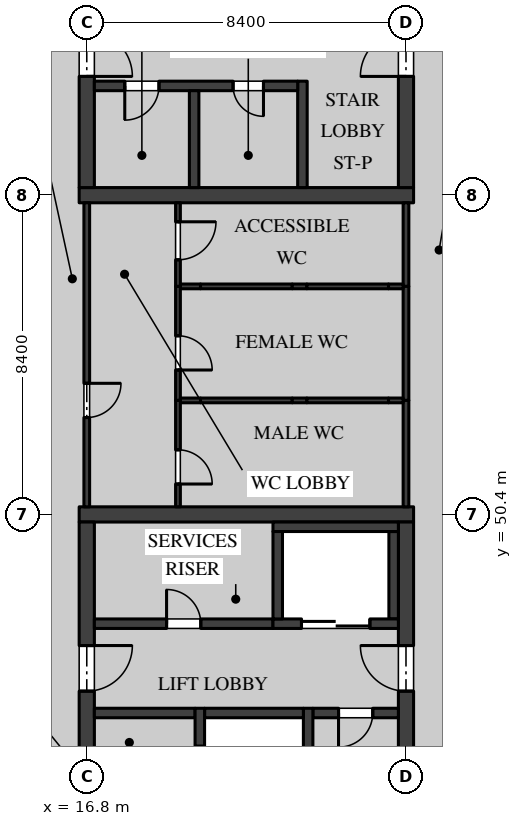
"""IFC4 building model, lengths in metres.
Left out: names, types, materials, properties, quantities, classifications, styles, units other than length and angle.
Written with IfcOpenShell. Run it as: python <this file> out.ifc"""

import sys

from ifc_helpers import new_model, si_unit, direction, frame, frame_2d, origin, place, context, subcontext, project, spatial, rectangle, extrude, element, fill, save


model = new_model("IFC4")
c1 = context("Model", 3, precision=1e-05, world=origin(), true_north=direction((0.0, 1.0)))
c2 = subcontext(c1, "Body", "Model", "MODEL_VIEW")
j1 = project(units=[si_unit("LENGTHUNIT", "METRE"), si_unit("PLANEANGLEUNIT", "RADIAN")], contexts=[c1])
p1 = place(None, origin())
s1 = spatial("IfcSite", under=j1, at=p1, CompositionType="ELEMENT")
p2 = place(p1, origin())
s2 = spatial("IfcBuilding", under=s1, at=p2, CompositionType="ELEMENT")
p3 = place(p2, frame((0.0, 0.0, 18.9)))
s3 = spatial("IfcBuildingStorey", under=s2, at=p3, CompositionType="ELEMENT", Elevation=18.9)
p4 = place(p3, frame((16.6, 50.4, 0.0), z_axis=(0.0, 0.0, 1.0), x_axis=(1.0, 0.0, 0.0)))
e1 = element("IfcWall", 1, at=p4, inside=s3, PredefinedType="SHEAR", context=c2, shape_type="SweptSolid", body=[
    extrude(rectangle(XDim=8.8, YDim=0.4, at=frame_2d((4.4, 0.0))), origin(), (0.0, 0.0, 1.0), 4.37),
])
p5 = place(p3, frame((16.8, 42.2, 0.0), z_axis=(0.0, 0.0, 1.0), x_axis=(0.0, 1.0, 0.0)))
e2 = element("IfcWall", 2, at=p5, inside=s3, PredefinedType="SHEAR", context=c2, shape_type="SweptSolid", body=[
    extrude(rectangle(XDim=8.0, YDim=0.4, at=frame_2d((4.0, 0.0))), origin(), (0.0, 0.0, 1.0), 4.37),
])
p6 = place(p5, frame((3.55, 0.0, 0.0)))
e3 = element("IfcOpeningElement", 3, at=p6, cuts=e2, PredefinedType="OPENING", context=c2, shape_type="SweptSolid", body=[
    extrude(rectangle(XDim=1.2, YDim=2.1, at=frame_2d((0.6, 1.05))), frame((0.0, 0.21, 0.0), z_axis=(0.0, -1.0, 0.0), x_axis=(1.0, 0.0, 0.0)), (0.0, 0.0, 1.0), 0.42),
])
p7 = place(p5, frame((0.8, 0.0, 0.0)))
e4 = element("IfcOpeningElement", 4, at=p7, cuts=e2, PredefinedType="OPENING", context=c2, shape_type="SweptSolid", body=[
    extrude(rectangle(XDim=1.2, YDim=2.1, at=frame_2d((0.6, 1.05))), frame((0.0, 0.21, 0.0), z_axis=(0.0, -1.0, 0.0), x_axis=(1.0, 0.0, 0.0)), (0.0, 0.0, 1.0), 0.42),
])
p8 = place(p3, frame((25.2, 42.2, 0.0), z_axis=(0.0, 0.0, 1.0), x_axis=(0.0, 1.0, 0.0)))
e5 = element("IfcWall", 5, at=p8, inside=s3, PredefinedType="SHEAR", context=c2, shape_type="SweptSolid", body=[
    extrude(rectangle(XDim=8.0, YDim=0.4, at=frame_2d((4.0, 0.0))), origin(), (0.0, 0.0, 1.0), 4.37),
])
p9 = place(p8, frame((3.55, 0.0, 0.0)))
e6 = element("IfcOpeningElement", 6, at=p9, cuts=e5, PredefinedType="OPENING", context=c2, shape_type="SweptSolid", body=[
    extrude(rectangle(XDim=1.2, YDim=2.1, at=frame_2d((0.6, 1.05))), frame((0.0, 0.21, 0.0), z_axis=(0.0, -1.0, 0.0), x_axis=(1.0, 0.0, 0.0)), (0.0, 0.0, 1.0), 0.42),
])
p10 = place(p3, frame((21.7, 47.525, 0.0), z_axis=(0.0, 0.0, 1.0), x_axis=(-1.0, 0.0, 0.0)))
e7 = element("IfcWall", 7, at=p10, inside=s3, PredefinedType="SOLIDWALL", context=c2, shape_type="SweptSolid", body=[
    extrude(rectangle(XDim=4.7, YDim=0.25, at=frame_2d((2.35, 0.0))), origin(), (0.0, 0.0, 1.0), 4.37),
])
p11 = place(p10, frame((1.9, 0.0, 0.0)))
e8 = element("IfcOpeningElement", 8, at=p11, cuts=e7, PredefinedType="OPENING", context=c2, shape_type="SweptSolid", body=[
    extrude(rectangle(XDim=0.9, YDim=2.1, at=frame_2d((0.45, 1.05))), frame((0.0, 0.135, 0.0), z_axis=(0.0, -1.0, 0.0), x_axis=(1.0, 0.0, 0.0)), (0.0, 0.0, 1.0), 0.27),
])
p12 = place(p3, frame((25.0, 45.175, 0.0), z_axis=(0.0, 0.0, 1.0), x_axis=(-1.0, 0.0, 0.0)))
e9 = element("IfcWall", 9, at=p12, inside=s3, PredefinedType="SOLIDWALL", context=c2, shape_type="SweptSolid", body=[
    extrude(rectangle(XDim=2.25, YDim=0.25, at=frame_2d((1.125, 0.0))), origin(), (0.0, 0.0, 1.0), 4.37),
])
p13 = place(p12, frame((0.675, 0.0, 0.0)))
e10 = element("IfcOpeningElement", 10, at=p13, cuts=e9, PredefinedType="OPENING", context=c2, shape_type="SweptSolid", body=[
    extrude(rectangle(XDim=0.9, YDim=2.1, at=frame_2d((0.45, 1.05))), frame((0.0, 0.135, 0.0), z_axis=(0.0, -1.0, 0.0), x_axis=(1.0, 0.0, 0.0)), (0.0, 0.0, 1.0), 0.27),
])
p14 = place(p3, frame((19.65, 45.175, 0.0), z_axis=(0.0, 0.0, 1.0), x_axis=(-1.0, 0.0, 0.0)))
e11 = element("IfcWall", 11, at=p14, inside=s3, PredefinedType="SOLIDWALL", context=c2, shape_type="SweptSolid", body=[
    extrude(rectangle(XDim=2.65, YDim=0.25, at=frame_2d((1.325, 0.0))), origin(), (0.0, 0.0, 1.0), 4.37),
])
p15 = place(p3, frame((16.6, 58.8, 0.0), z_axis=(0.0, 0.0, 1.0), x_axis=(1.0, 0.0, 0.0)))
e12 = element("IfcWall", 12, at=p15, inside=s3, PredefinedType="SHEAR", context=c2, shape_type="SweptSolid", body=[
    extrude(rectangle(XDim=8.8, YDim=0.4, at=frame_2d((4.4, 0.0))), origin(), (0.0, 0.0, 1.0), 4.37),
])
p16 = place(p3, frame((16.8, 59.0, 0.0), z_axis=(0.0, 0.0, 1.0), x_axis=(0.0, 1.0, 0.0)))
e13 = element("IfcWall", 13, at=p16, inside=s3, PredefinedType="SHEAR", context=c2, shape_type="SweptSolid", body=[
    extrude(rectangle(XDim=8.0, YDim=0.4, at=frame_2d((4.0, 0.0))), origin(), (0.0, 0.0, 1.0), 4.37),
])
p17 = place(p16, frame((2.925, 0.0, 0.0)))
e14 = element("IfcOpeningElement", 14, at=p17, cuts=e13, PredefinedType="OPENING", context=c2, shape_type="SweptSolid", body=[
    extrude(rectangle(XDim=1.2, YDim=2.1, at=frame_2d((0.6, 1.05))), frame((0.0, 0.21, 0.0), z_axis=(0.0, -1.0, 0.0), x_axis=(1.0, 0.0, 0.0)), (0.0, 0.0, 1.0), 0.42),
])
p18 = place(p3, frame((25.2, 59.0, 0.0), z_axis=(0.0, 0.0, 1.0), x_axis=(0.0, 1.0, 0.0)))
e15 = element("IfcWall", 15, at=p18, inside=s3, PredefinedType="SHEAR", context=c2, shape_type="SweptSolid", body=[
    extrude(rectangle(XDim=8.0, YDim=0.4, at=frame_2d((4.0, 0.0))), origin(), (0.0, 0.0, 1.0), 4.37),
])
p19 = place(p18, frame((2.925, 0.0, 0.0)))
e16 = element("IfcOpeningElement", 16, at=p19, cuts=e15, PredefinedType="OPENING", context=c2, shape_type="SweptSolid", body=[
    extrude(rectangle(XDim=1.2, YDim=2.1, at=frame_2d((0.6, 1.05))), frame((0.0, 0.21, 0.0), z_axis=(0.0, -1.0, 0.0), x_axis=(1.0, 0.0, 0.0)), (0.0, 0.0, 1.0), 0.42),
])
p20 = place(p3, frame((22.475, 61.8, 0.0), z_axis=(0.0, 0.0, 1.0), x_axis=(0.0, -1.0, 0.0)))
e17 = element("IfcWall", 17, at=p20, inside=s3, PredefinedType="SOLIDWALL", context=c2, shape_type="SweptSolid", body=[
    extrude(rectangle(XDim=2.8, YDim=0.25, at=frame_2d((1.4, 0.0))), origin(), (0.0, 0.0, 1.0), 4.37),
])
p21 = place(p3, frame((22.35, 61.675, 0.0), z_axis=(0.0, 0.0, 1.0), x_axis=(-1.0, 0.0, 0.0)))
e18 = element("IfcWall", 18, at=p21, inside=s3, PredefinedType="SOLIDWALL", context=c2, shape_type="SweptSolid", body=[
    extrude(rectangle(XDim=5.35, YDim=0.25, at=frame_2d((2.675, 0.0))), origin(), (0.0, 0.0, 1.0), 4.37),
])
p22 = place(p21, frame((3.65, 0.0, 0.0)))
e19 = element("IfcOpeningElement", 19, at=p22, cuts=e18, PredefinedType="OPENING", context=c2, shape_type="SweptSolid", body=[
    extrude(rectangle(XDim=0.9, YDim=2.1, at=frame_2d((0.45, 1.05))), frame((0.0, 0.135, 0.0), z_axis=(0.0, -1.0, 0.0), x_axis=(1.0, 0.0, 0.0)), (0.0, 0.0, 1.0), 0.27),
])
p23 = place(p21, frame((0.9, 0.0, 0.0)))
e20 = element("IfcOpeningElement", 20, at=p23, cuts=e18, PredefinedType="OPENING", context=c2, shape_type="SweptSolid", body=[
    extrude(rectangle(XDim=0.8, YDim=2.1, at=frame_2d((0.4, 1.05))), frame((0.0, 0.135, 0.0), z_axis=(0.0, -1.0, 0.0), x_axis=(1.0, 0.0, 0.0)), (0.0, 0.0, 1.0), 0.27),
])
p24 = place(p3, frame((19.625, 61.55, 0.0), z_axis=(0.0, 0.0, 1.0), x_axis=(0.0, -1.0, 0.0)))
e21 = element("IfcWall", 21, at=p24, inside=s3, PredefinedType="SOLIDWALL", context=c2, shape_type="SweptSolid", body=[
    extrude(rectangle(XDim=2.55, YDim=0.25, at=frame_2d((1.275, 0.0))), origin(), (0.0, 0.0, 1.0), 4.37),
])
p25 = place(p3, frame((24.875, 47.65, 0.0), z_axis=(0.0, 0.0, 1.0), x_axis=(0.0, 1.0, 0.0)))
e22 = element("IfcWall", 22, at=p25, inside=s3, PredefinedType="SOLIDWALL", context=c2, shape_type="SweptSolid", body=[
    extrude(rectangle(XDim=2.3, YDim=0.25, at=frame_2d((1.15, 0.0))), origin(), (0.0, 0.0, 1.0), 4.37),
])
p26 = place(p3, frame((21.7, 50.075, 0.0), z_axis=(0.0, 0.0, 1.0), x_axis=(1.0, 0.0, 0.0)))
e23 = element("IfcWall", 23, at=p26, inside=s3, PredefinedType="SOLIDWALL", context=c2, shape_type="SweptSolid", body=[
    extrude(rectangle(XDim=3.3, YDim=0.25, at=frame_2d((1.65, 0.0))), origin(), (0.0, 0.0, 1.0), 4.37),
])
p27 = place(p3, frame((21.7, 47.525, 0.0), z_axis=(0.0, 0.0, 1.0), x_axis=(1.0, 0.0, 0.0)))
e24 = element("IfcWall", 24, at=p27, inside=s3, PredefinedType="SOLIDWALL", context=c2, shape_type="SweptSolid", body=[
    extrude(rectangle(XDim=3.3, YDim=0.25, at=frame_2d((1.65, 0.0))), origin(), (0.0, 0.0, 1.0), 4.37),
])
p28 = place(p27, frame((0.75, 0.0, 0.0)))
e25 = element("IfcOpeningElement", 25, at=p28, cuts=e24, PredefinedType="OPENING", context=c2, shape_type="SweptSolid", body=[
    extrude(rectangle(XDim=1.8, YDim=2.1, at=frame_2d((0.9, 1.05))), frame((0.0, 0.135, 0.0), z_axis=(0.0, -1.0, 0.0), x_axis=(1.0, 0.0, 0.0)), (0.0, 0.0, 1.0), 0.27),
])
p29 = place(p3, frame((21.825, 47.65, 0.0), z_axis=(0.0, 0.0, 1.0), x_axis=(0.0, 1.0, 0.0)))
e26 = element("IfcWall", 26, at=p29, inside=s3, PredefinedType="SOLIDWALL", context=c2, shape_type="SweptSolid", body=[
    extrude(rectangle(XDim=2.3, YDim=0.25, at=frame_2d((1.15, 0.0))), origin(), (0.0, 0.0, 1.0), 4.37),
])
p30 = place(p3, frame((22.625, 42.2, 0.0), z_axis=(0.0, 0.0, 1.0), x_axis=(0.0, 1.0, 0.0)))
e27 = element("IfcWall", 27, at=p30, inside=s3, PredefinedType="SOLIDWALL", context=c2, shape_type="SweptSolid", body=[
    extrude(rectangle(XDim=3.1, YDim=0.25, at=frame_2d((1.55, 0.0))), origin(), (0.0, 0.0, 1.0), 4.37),
])
p31 = place(p3, frame((19.9, 45.175, 0.0), z_axis=(0.0, 0.0, 1.0), x_axis=(1.0, 0.0, 0.0)))
e28 = element("IfcWall", 28, at=p31, inside=s3, PredefinedType="SOLIDWALL", context=c2, shape_type="SweptSolid", body=[
    extrude(rectangle(XDim=2.6, YDim=0.25, at=frame_2d((1.3, 0.0))), origin(), (0.0, 0.0, 1.0), 4.37),
])
p32 = place(p3, frame((19.775, 42.2, 0.0), z_axis=(0.0, 0.0, 1.0), x_axis=(0.0, 1.0, 0.0)))
e29 = element("IfcWall", 29, at=p32, inside=s3, PredefinedType="SOLIDWALL", context=c2, shape_type="SweptSolid", body=[
    extrude(rectangle(XDim=3.1, YDim=0.25, at=frame_2d((1.55, 0.0))), origin(), (0.0, 0.0, 1.0), 4.37),
])
p33 = place(p32, frame((1.0, 0.0, 0.0)))
e30 = element("IfcOpeningElement", 30, at=p33, cuts=e29, PredefinedType="OPENING", context=c2, shape_type="SweptSolid", body=[
    extrude(rectangle(XDim=1.1, YDim=2.1, at=frame_2d((0.55, 1.05))), frame((0.0, 0.135, 0.0), z_axis=(0.0, -1.0, 0.0), x_axis=(1.0, 0.0, 0.0)), (0.0, 0.0, 1.0), 0.27),
])
p34 = place(p3, frame((25.2, 56.4, 0.0), z_axis=(0.0, 0.0, 1.0), x_axis=(0.0, 1.0, 0.0)))
e31 = element("IfcWall", 31, at=p34, inside=s3, PredefinedType="PARTITIONING", context=c2, shape_type="SweptSolid", body=[
    extrude(rectangle(XDim=2.2, YDim=0.15, at=frame_2d((1.1, 0.0))), origin(), (0.0, 0.0, 1.0), 3.746),
])
p35 = place(p3, frame((25.2, 53.4, 0.0), z_axis=(0.0, 0.0, 1.0), x_axis=(0.0, 1.0, 0.0)))
e32 = element("IfcWall", 32, at=p35, inside=s3, PredefinedType="PARTITIONING", context=c2, shape_type="SweptSolid", body=[
    extrude(rectangle(XDim=3.0, YDim=0.15, at=frame_2d((1.5, 0.0))), origin(), (0.0, 0.0, 1.0), 3.746),
])
p36 = place(p3, frame((25.2, 50.6, 0.0), z_axis=(0.0, 0.0, 1.0), x_axis=(0.0, 1.0, 0.0)))
e33 = element("IfcWall", 33, at=p36, inside=s3, PredefinedType="PARTITIONING", context=c2, shape_type="SweptSolid", body=[
    extrude(rectangle(XDim=2.8, YDim=0.15, at=frame_2d((1.4, 0.0))), origin(), (0.0, 0.0, 1.0), 3.746),
])
p37 = place(p3, frame((16.8, 50.6, 0.0), z_axis=(0.0, 0.0, 1.0), x_axis=(0.0, 1.0, 0.0)))
e34 = element("IfcWall", 34, at=p37, inside=s3, PredefinedType="PARTITIONING", context=c2, shape_type="SweptSolid", body=[
    extrude(rectangle(XDim=8.0, YDim=0.15, at=frame_2d((4.0, 0.0))), origin(), (0.0, 0.0, 1.0), 3.746),
])
p38 = place(p37, frame((2.35, 0.0, 0.0)))
e35 = element("IfcOpeningElement", 35, at=p38, cuts=e34, PredefinedType="OPENING", context=c2, shape_type="SweptSolid", body=[
    extrude(rectangle(XDim=0.9, YDim=2.1, at=frame_2d((0.45, 1.05))), frame((0.0, 0.085, 0.0), z_axis=(0.0, -1.0, 0.0), x_axis=(1.0, 0.0, 0.0)), (0.0, 0.0, 1.0), 0.17),
])
p39 = place(p3, frame((19.262, 56.4, 0.0), z_axis=(0.0, 0.0, 1.0), x_axis=(1.0, 0.0, 0.0)))
e36 = element("IfcWall", 36, at=p39, inside=s3, PredefinedType="PARTITIONING", context=c2, shape_type="SweptSolid", body=[
    extrude(rectangle(XDim=0.531, YDim=0.125, at=frame_2d((0.266, 0.0))), origin(), (0.0, 0.0, 1.0), 3.895),
])
p40 = place(p3, frame((19.793, 56.4, 0.0), z_axis=(0.0, 0.0, 1.0), x_axis=(1.0, 0.0, 0.0)))
e37 = element("IfcWall", 37, at=p40, inside=s3, PredefinedType="PARTITIONING", context=c2, shape_type="SweptSolid", body=[
    extrude(rectangle(XDim=2.414, YDim=0.125, at=frame_2d((1.207, 0.0))), origin(), (0.0, 0.0, 1.0), 4.37),
])
p41 = place(p3, frame((22.207, 56.4, 0.0), z_axis=(0.0, 0.0, 1.0), x_axis=(1.0, 0.0, 0.0)))
e38 = element("IfcWall", 38, at=p41, inside=s3, PredefinedType="PARTITIONING", context=c2, shape_type="SweptSolid", body=[
    extrude(rectangle(XDim=0.385, YDim=0.125, at=frame_2d((0.192, 0.0))), origin(), (0.0, 0.0, 1.0), 3.895),
])
p42 = place(p3, frame((22.592, 56.4, 0.0), z_axis=(0.0, 0.0, 1.0), x_axis=(1.0, 0.0, 0.0)))
e39 = element("IfcWall", 39, at=p42, inside=s3, PredefinedType="PARTITIONING", context=c2, shape_type="SweptSolid", body=[
    extrude(rectangle(XDim=2.148, YDim=0.125, at=frame_2d((1.074, 0.0))), origin(), (0.0, 0.0, 1.0), 4.37),
])
p43 = place(p3, frame((24.74, 56.4, 0.0), z_axis=(0.0, 0.0, 1.0), x_axis=(1.0, 0.0, 0.0)))
e40 = element("IfcWall", 40, at=p43, inside=s3, PredefinedType="PARTITIONING", context=c2, shape_type="SweptSolid", body=[
    extrude(rectangle(XDim=0.385, YDim=0.125, at=frame_2d((0.192, 0.0))), origin(), (0.0, 0.0, 1.0), 3.746),
])
p44 = place(p3, frame((19.2, 56.4, 0.0), z_axis=(0.0, 0.0, 1.0), x_axis=(0.0, 1.0, 0.0)))
e41 = element("IfcWall", 41, at=p44, inside=s3, PredefinedType="PARTITIONING", context=c2, shape_type="SweptSolid", body=[
    extrude(rectangle(XDim=2.2, YDim=0.125, at=frame_2d((1.1, 0.0))), origin(), (0.0, 0.0, 1.0), 4.37),
])
p45 = place(p44, frame((0.7, 0.0, 0.0)))
e42 = element("IfcOpeningElement", 42, at=p45, cuts=e41, PredefinedType="OPENING", context=c2, shape_type="SweptSolid", body=[
    extrude(rectangle(XDim=1.0, YDim=2.1, at=frame_2d((0.5, 1.05))), frame((0.0, 0.073, 0.0), z_axis=(0.0, -1.0, 0.0), x_axis=(1.0, 0.0, 0.0)), (0.0, 0.0, 1.0), 0.145),
])
p46 = place(p3, frame((19.2, 53.4, 0.0), z_axis=(0.0, 0.0, 1.0), x_axis=(0.0, 1.0, 0.0)))
e43 = element("IfcWall", 43, at=p46, inside=s3, PredefinedType="PARTITIONING", context=c2, shape_type="SweptSolid", body=[
    extrude(rectangle(XDim=3.0, YDim=0.125, at=frame_2d((1.5, 0.0))), origin(), (0.0, 0.0, 1.0), 4.37),
])
p47 = place(p46, frame((0.8, 0.0, 0.0)))
e44 = element("IfcOpeningElement", 44, at=p47, cuts=e43, PredefinedType="OPENING", context=c2, shape_type="SweptSolid", body=[
    extrude(rectangle(XDim=0.9, YDim=2.1, at=frame_2d((0.45, 1.05))), frame((0.0, 0.073, 0.0), z_axis=(0.0, -1.0, 0.0), x_axis=(1.0, 0.0, 0.0)), (0.0, 0.0, 1.0), 0.145),
])
p48 = place(p3, frame((19.262, 53.4, 0.0), z_axis=(0.0, 0.0, 1.0), x_axis=(1.0, 0.0, 0.0)))
e45 = element("IfcWall", 45, at=p48, inside=s3, PredefinedType="PARTITIONING", context=c2, shape_type="SweptSolid", body=[
    extrude(rectangle(XDim=0.531, YDim=0.125, at=frame_2d((0.266, 0.0))), origin(), (0.0, 0.0, 1.0), 3.895),
])
p49 = place(p3, frame((19.793, 53.4, 0.0), z_axis=(0.0, 0.0, 1.0), x_axis=(1.0, 0.0, 0.0)))
e46 = element("IfcWall", 46, at=p49, inside=s3, PredefinedType="PARTITIONING", context=c2, shape_type="SweptSolid", body=[
    extrude(rectangle(XDim=2.414, YDim=0.125, at=frame_2d((1.207, 0.0))), origin(), (0.0, 0.0, 1.0), 4.37),
])
p50 = place(p3, frame((22.207, 53.4, 0.0), z_axis=(0.0, 0.0, 1.0), x_axis=(1.0, 0.0, 0.0)))
e47 = element("IfcWall", 47, at=p50, inside=s3, PredefinedType="PARTITIONING", context=c2, shape_type="SweptSolid", body=[
    extrude(rectangle(XDim=0.385, YDim=0.125, at=frame_2d((0.192, 0.0))), origin(), (0.0, 0.0, 1.0), 3.895),
])
p51 = place(p3, frame((22.592, 53.4, 0.0), z_axis=(0.0, 0.0, 1.0), x_axis=(1.0, 0.0, 0.0)))
e48 = element("IfcWall", 48, at=p51, inside=s3, PredefinedType="PARTITIONING", context=c2, shape_type="SweptSolid", body=[
    extrude(rectangle(XDim=2.148, YDim=0.125, at=frame_2d((1.074, 0.0))), origin(), (0.0, 0.0, 1.0), 4.37),
])
p52 = place(p3, frame((24.74, 53.4, 0.0), z_axis=(0.0, 0.0, 1.0), x_axis=(1.0, 0.0, 0.0)))
e49 = element("IfcWall", 49, at=p52, inside=s3, PredefinedType="PARTITIONING", context=c2, shape_type="SweptSolid", body=[
    extrude(rectangle(XDim=0.385, YDim=0.125, at=frame_2d((0.192, 0.0))), origin(), (0.0, 0.0, 1.0), 3.746),
])
p53 = place(p3, frame((19.2, 50.6, 0.0), z_axis=(0.0, 0.0, 1.0), x_axis=(0.0, 1.0, 0.0)))
e50 = element("IfcWall", 50, at=p53, inside=s3, PredefinedType="PARTITIONING", context=c2, shape_type="SweptSolid", body=[
    extrude(rectangle(XDim=2.8, YDim=0.125, at=frame_2d((1.4, 0.0))), origin(), (0.0, 0.0, 1.0), 4.37),
])
p54 = place(p53, frame((0.6, 0.0, 0.0)))
e51 = element("IfcOpeningElement", 51, at=p54, cuts=e50, PredefinedType="OPENING", context=c2, shape_type="SweptSolid", body=[
    extrude(rectangle(XDim=0.9, YDim=2.1, at=frame_2d((0.45, 1.05))), frame((0.0, 0.073, 0.0), z_axis=(0.0, -1.0, 0.0), x_axis=(1.0, 0.0, 0.0)), (0.0, 0.0, 1.0), 0.145),
])
p55 = place(p6, frame((1.2, 0.0, 0.0), z_axis=(0.0, 0.0, 1.0), x_axis=(-1.0, 0.0, 0.0)))
e52 = element("IfcDoor", 52, at=p55, inside=s3, OperationType="SINGLE_SWING_RIGHT", PredefinedType="DOOR", context=c2, shape_type="SweptSolid", body=[
    extrude(rectangle(XDim=1.2, YDim=2.1, at=frame_2d((0.6, 1.05))), frame((0.0, 0.035, 0.0), z_axis=(0.0, -1.0, 0.0), x_axis=(1.0, 0.0, 0.0)), (0.0, 0.0, 1.0), 0.07),
])
fill(e3, e52)
p56 = place(p9, origin())
e53 = element("IfcDoor", 53, at=p56, inside=s3, OperationType="SINGLE_SWING_LEFT", PredefinedType="DOOR", context=c2, shape_type="SweptSolid", body=[
    extrude(rectangle(XDim=1.2, YDim=2.1, at=frame_2d((0.6, 1.05))), frame((0.0, 0.035, 0.0), z_axis=(0.0, -1.0, 0.0), x_axis=(1.0, 0.0, 0.0)), (0.0, 0.0, 1.0), 0.07),
])
fill(e6, e53)
p57 = place(p11, frame((0.9, 0.0, 0.0), z_axis=(0.0, 0.0, 1.0), x_axis=(-1.0, 0.0, 0.0)))
e54 = element("IfcDoor", 54, at=p57, inside=s3, OperationType="SINGLE_SWING_RIGHT", PredefinedType="DOOR", context=c2, shape_type="SweptSolid", body=[
    extrude(rectangle(XDim=0.9, YDim=2.1, at=frame_2d((0.45, 1.05))), frame((0.0, 0.035, 0.0), z_axis=(0.0, -1.0, 0.0), x_axis=(1.0, 0.0, 0.0)), (0.0, 0.0, 1.0), 0.07),
])
fill(e8, e54)
p58 = place(p13, origin())
e55 = element("IfcDoor", 55, at=p58, inside=s3, OperationType="SINGLE_SWING_LEFT", PredefinedType="DOOR", context=c2, shape_type="SweptSolid", body=[
    extrude(rectangle(XDim=0.9, YDim=2.1, at=frame_2d((0.45, 1.05))), frame((0.0, 0.05, 0.0), z_axis=(0.0, -1.0, 0.0), x_axis=(1.0, 0.0, 0.0)), (0.0, 0.0, 1.0), 0.1),
])
fill(e10, e55)
p59 = place(p22, origin())
e56 = element("IfcDoor", 56, at=p59, inside=s3, OperationType="SINGLE_SWING_LEFT", PredefinedType="DOOR", context=c2, shape_type="SweptSolid", body=[
    extrude(rectangle(XDim=0.9, YDim=2.1, at=frame_2d((0.45, 1.05))), frame((0.0, 0.035, 0.0), z_axis=(0.0, -1.0, 0.0), x_axis=(1.0, 0.0, 0.0)), (0.0, 0.0, 1.0), 0.07),
])
fill(e19, e56)
p60 = place(p17, frame((1.2, 0.0, 0.0), z_axis=(0.0, 0.0, 1.0), x_axis=(-1.0, 0.0, 0.0)))
e57 = element("IfcDoor", 57, at=p60, inside=s3, OperationType="SINGLE_SWING_LEFT", PredefinedType="DOOR", context=c2, shape_type="SweptSolid", body=[
    extrude(rectangle(XDim=1.2, YDim=2.1, at=frame_2d((0.6, 1.05))), frame((0.0, 0.035, 0.0), z_axis=(0.0, -1.0, 0.0), x_axis=(1.0, 0.0, 0.0)), (0.0, 0.0, 1.0), 0.07),
])
fill(e14, e57)
p61 = place(p19, origin())
e58 = element("IfcDoor", 58, at=p61, inside=s3, OperationType="SINGLE_SWING_RIGHT", PredefinedType="DOOR", context=c2, shape_type="SweptSolid", body=[
    extrude(rectangle(XDim=1.2, YDim=2.1, at=frame_2d((0.6, 1.05))), frame((0.0, 0.035, 0.0), z_axis=(0.0, -1.0, 0.0), x_axis=(1.0, 0.0, 0.0)), (0.0, 0.0, 1.0), 0.07),
])
fill(e16, e58)
p62 = place(p23, origin())
e59 = element("IfcDoor", 59, at=p62, inside=s3, OperationType="SINGLE_SWING_RIGHT", PredefinedType="DOOR", context=c2, shape_type="SweptSolid", body=[
    extrude(rectangle(XDim=0.8, YDim=2.1, at=frame_2d((0.4, 1.05))), frame((0.0, 0.035, 0.0), z_axis=(0.0, -1.0, 0.0), x_axis=(1.0, 0.0, 0.0)), (0.0, 0.0, 1.0), 0.07),
])
fill(e20, e59)
p63 = place(p28, origin())
e60 = element("IfcDoor", 60, at=p63, inside=s3, OperationType="DOUBLE_DOOR_SLIDING", PredefinedType="DOOR", context=c2, shape_type="SweptSolid", body=[
    extrude(rectangle(XDim=1.8, YDim=2.1, at=frame_2d((0.9, 1.05))), frame((0.0, 0.04, 0.0), z_axis=(0.0, -1.0, 0.0), x_axis=(1.0, 0.0, 0.0)), (0.0, 0.0, 1.0), 0.08),
])
fill(e25, e60)
p64 = place(p45, frame((1.0, 0.0, 0.0), z_axis=(0.0, 0.0, 1.0), x_axis=(-1.0, 0.0, 0.0)))
e61 = element("IfcDoor", 61, at=p64, inside=s3, OperationType="SINGLE_SWING_RIGHT", PredefinedType="DOOR", context=c2, shape_type="SweptSolid", body=[
    extrude(rectangle(XDim=1.0, YDim=2.1, at=frame_2d((0.5, 1.05))), frame((0.0, 0.02, 0.0), z_axis=(0.0, -1.0, 0.0), x_axis=(1.0, 0.0, 0.0)), (0.0, 0.0, 1.0), 0.04),
])
fill(e42, e61)
p65 = place(p47, frame((0.9, 0.0, 0.0), z_axis=(0.0, 0.0, 1.0), x_axis=(-1.0, 0.0, 0.0)))
e62 = element("IfcDoor", 62, at=p65, inside=s3, OperationType="SINGLE_SWING_LEFT", PredefinedType="DOOR", context=c2, shape_type="SweptSolid", body=[
    extrude(rectangle(XDim=0.9, YDim=2.1, at=frame_2d((0.45, 1.05))), frame((0.0, 0.02, 0.0), z_axis=(0.0, -1.0, 0.0), x_axis=(1.0, 0.0, 0.0)), (0.0, 0.0, 1.0), 0.04),
])
fill(e44, e62)
p66 = place(p38, frame((0.9, 0.0, 0.0), z_axis=(0.0, 0.0, 1.0), x_axis=(-1.0, 0.0, 0.0)))
e63 = element("IfcDoor", 63, at=p66, inside=s3, OperationType="SINGLE_SWING_RIGHT", PredefinedType="DOOR", context=c2, shape_type="SweptSolid", body=[
    extrude(rectangle(XDim=0.9, YDim=2.1, at=frame_2d((0.45, 1.05))), frame((0.0, 0.025, 0.0), z_axis=(0.0, -1.0, 0.0), x_axis=(1.0, 0.0, 0.0)), (0.0, 0.0, 1.0), 0.05),
])
fill(e35, e63)
p67 = place(p54, frame((0.9, 0.0, 0.0), z_axis=(0.0, 0.0, 1.0), x_axis=(-1.0, 0.0, 0.0)))
e64 = element("IfcDoor", 64, at=p67, inside=s3, OperationType="SINGLE_SWING_LEFT", PredefinedType="DOOR", context=c2, shape_type="SweptSolid", body=[
    extrude(rectangle(XDim=0.9, YDim=2.1, at=frame_2d((0.45, 1.05))), frame((0.0, 0.02, 0.0), z_axis=(0.0, -1.0, 0.0), x_axis=(1.0, 0.0, 0.0)), (0.0, 0.0, 1.0), 0.04),
])
fill(e51, e64)
save(model, sys.argv[1])
